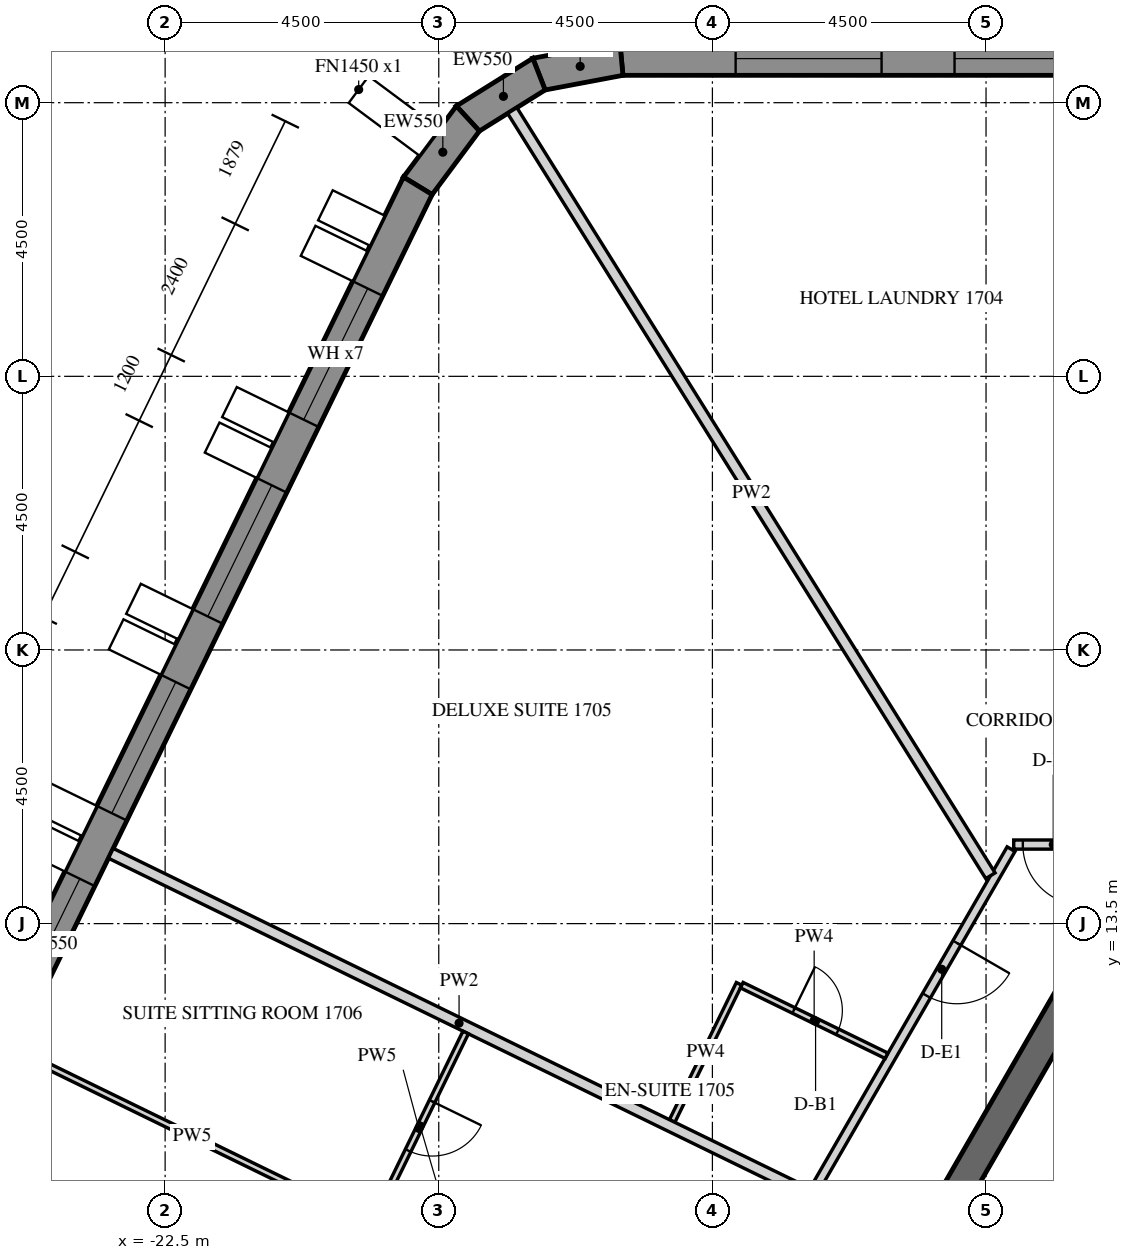
"""IFC4 building model, lengths in metres.
Left out: names, types, materials, properties, quantities, classifications, styles, units other than length and angle.
Written with IfcOpenShell. Run it as: python <this file> out.ifc"""

import sys

from ifc_helpers import new_model, si_unit, direction, frame, frame_2d, origin, place, context, subcontext, project, spatial, polyline, rectangle, outline, extrude, element, fill, save


model = new_model("IFC4")
c1 = context("Model", 3, precision=1e-05, world=origin(), true_north=direction((0.0, 1.0)))
c2 = subcontext(c1, "Body", "Model", "MODEL_VIEW")
j1 = project(units=[si_unit("LENGTHUNIT", "METRE"), si_unit("PLANEANGLEUNIT", "RADIAN")], contexts=[c1])
p1 = place(None, origin())
s1 = spatial("IfcSite", under=j1, at=p1, CompositionType="ELEMENT")
p2 = place(p1, origin())
s2 = spatial("IfcBuilding", under=s1, at=p2, CompositionType="ELEMENT")
p3 = place(p2, frame((0.0, 0.0, 215.1)))
s3 = spatial("IfcBuildingStorey", under=s2, at=p3, CompositionType="ELEMENT", Elevation=215.1)
p4 = place(p3, frame((12.761, 27.725, -0.15), z_axis=(0.0, 0.0, 1.0), x_axis=(-1.0, 0.0, 0.0)))
e1 = element("IfcWall", 1, at=p4, inside=s3, PredefinedType="SOLIDWALL", context=c2, shape_type="SweptSolid", body=[
    extrude(outline(polyline([(-0.022, -0.275), (27.783, -0.275), (27.732, 0.275), (0.022, 0.275), (-0.022, -0.275)])), origin(), (0.0, 0.0, 1.0), 3.9),
])
p5 = place(p4, frame((1.879, 0.0, 1.05)))
e2 = element("IfcOpeningElement", 2, at=p5, cuts=e1, PredefinedType="OPENING", context=c2, shape_type="SweptSolid", body=[
    extrude(rectangle(XDim=2.4, YDim=2.4, at=frame_2d((1.2, 1.2))), frame((0.0, 0.285, 0.0), z_axis=(0.0, -1.0, 0.0), x_axis=(1.0, 0.0, 0.0)), (0.0, 0.0, 1.0), 0.57),
])
p6 = place(p4, frame((5.479, 0.0, 1.05)))
e3 = element("IfcOpeningElement", 3, at=p6, cuts=e1, PredefinedType="OPENING", context=c2, shape_type="SweptSolid", body=[
    extrude(rectangle(XDim=2.4, YDim=2.4, at=frame_2d((1.2, 1.2))), frame((0.0, 0.285, 0.0), z_axis=(0.0, -1.0, 0.0), x_axis=(1.0, 0.0, 0.0)), (0.0, 0.0, 1.0), 0.57),
])
p7 = place(p4, frame((9.079, 0.0, 1.05)))
e4 = element("IfcOpeningElement", 4, at=p7, cuts=e1, PredefinedType="OPENING", context=c2, shape_type="SweptSolid", body=[
    extrude(rectangle(XDim=2.4, YDim=2.4, at=frame_2d((1.2, 1.2))), frame((0.0, 0.285, 0.0), z_axis=(0.0, -1.0, 0.0), x_axis=(1.0, 0.0, 0.0)), (0.0, 0.0, 1.0), 0.57),
])
p8 = place(p4, frame((12.679, 0.0, 1.05)))
e5 = element("IfcOpeningElement", 5, at=p8, cuts=e1, PredefinedType="OPENING", context=c2, shape_type="SweptSolid", body=[
    extrude(rectangle(XDim=2.4, YDim=2.4, at=frame_2d((1.2, 1.2))), frame((0.0, 0.285, 0.0), z_axis=(0.0, -1.0, 0.0), x_axis=(1.0, 0.0, 0.0)), (0.0, 0.0, 1.0), 0.57),
])
p9 = place(p4, frame((16.279, 0.0, 1.05)))
e6 = element("IfcOpeningElement", 6, at=p9, cuts=e1, PredefinedType="OPENING", context=c2, shape_type="SweptSolid", body=[
    extrude(rectangle(XDim=2.4, YDim=2.4, at=frame_2d((1.2, 1.2))), frame((0.0, 0.285, 0.0), z_axis=(0.0, -1.0, 0.0), x_axis=(1.0, 0.0, 0.0)), (0.0, 0.0, 1.0), 0.57),
])
p10 = place(p4, frame((19.879, 0.0, 1.05)))
e7 = element("IfcOpeningElement", 7, at=p10, cuts=e1, PredefinedType="OPENING", context=c2, shape_type="SweptSolid", body=[
    extrude(rectangle(XDim=2.4, YDim=2.4, at=frame_2d((1.2, 1.2))), frame((0.0, 0.285, 0.0), z_axis=(0.0, -1.0, 0.0), x_axis=(1.0, 0.0, 0.0)), (0.0, 0.0, 1.0), 0.57),
])
p11 = place(p4, frame((23.479, 0.0, 1.05)))
e8 = element("IfcOpeningElement", 8, at=p11, cuts=e1, PredefinedType="OPENING", context=c2, shape_type="SweptSolid", body=[
    extrude(rectangle(XDim=2.4, YDim=2.4, at=frame_2d((1.2, 1.2))), frame((0.0, 0.285, 0.0), z_axis=(0.0, -1.0, 0.0), x_axis=(1.0, 0.0, 0.0)), (0.0, 0.0, 1.0), 0.57),
])
p12 = place(p3, frame((-14.997, 27.725, -0.15), z_axis=(0.0, 0.0, 1.0), x_axis=(-0.982705443133, -0.185175624845, 0.0)))
e9 = element("IfcWall", 9, at=p12, inside=s3, PredefinedType="SOLIDWALL", context=c2, shape_type="SweptSolid", body=[
    extrude(outline(polyline([(-0.026, -0.275), (1.431, -0.275), (1.327, 0.275), (0.026, 0.275), (-0.026, -0.275)])), origin(), (0.0, 0.0, 1.0), 3.9),
])
p13 = place(p3, frame((-16.352, 27.47, -0.15), z_axis=(0.0, 0.0, 1.0), x_axis=(-0.848057977594, -0.5299034503, 0.0)))
e10 = element("IfcWall", 10, at=p13, inside=s3, PredefinedType="SOLIDWALL", context=c2, shape_type="SweptSolid", body=[
    extrude(outline(polyline([(-0.052, -0.275), (1.431, -0.275), (1.327, 0.275), (0.052, 0.275), (-0.052, -0.275)])), origin(), (0.0, 0.0, 1.0), 3.9),
])
p14 = place(p3, frame((-17.521, 26.739, -0.15), z_axis=(0.0, 0.0, 1.0), x_axis=(-0.597135295884, -0.802140535324, 0.0)))
e11 = element("IfcWall", 11, at=p14, inside=s3, PredefinedType="SOLIDWALL", context=c2, shape_type="SweptSolid", body=[
    extrude(outline(polyline([(-0.052, -0.275), (1.405, -0.275), (1.354, 0.275), (0.052, 0.275), (-0.052, -0.275)])), origin(), (0.0, 0.0, 1.0), 3.9),
])
p15 = place(p3, frame((-18.345, 25.633, -0.15), z_axis=(0.0, 0.0, 1.0), x_axis=(-0.43837181828, -0.898793718791, 0.0)))
e12 = element("IfcWall", 12, at=p15, inside=s3, PredefinedType="SOLIDWALL", context=c2, shape_type="SweptSolid", body=[
    extrude(outline(polyline([(-0.026, -0.275), (27.78, -0.275), (27.735, 0.275), (0.026, 0.275), (-0.026, -0.275)])), origin(), (0.0, 0.0, 1.0), 3.9),
])
p16 = place(p15, frame((1.879, 0.0, 1.05)))
e13 = element("IfcOpeningElement", 13, at=p16, cuts=e12, PredefinedType="OPENING", context=c2, shape_type="SweptSolid", body=[
    extrude(rectangle(XDim=2.4, YDim=2.4, at=frame_2d((1.2, 1.2))), frame((0.0, 0.285, 0.0), z_axis=(0.0, -1.0, 0.0), x_axis=(1.0, 0.0, 0.0)), (0.0, 0.0, 1.0), 0.57),
])
p17 = place(p15, frame((5.479, 0.0, 1.05)))
e14 = element("IfcOpeningElement", 14, at=p17, cuts=e12, PredefinedType="OPENING", context=c2, shape_type="SweptSolid", body=[
    extrude(rectangle(XDim=2.4, YDim=2.4, at=frame_2d((1.2, 1.2))), frame((0.0, 0.285, 0.0), z_axis=(0.0, -1.0, 0.0), x_axis=(1.0, 0.0, 0.0)), (0.0, 0.0, 1.0), 0.57),
])
p18 = place(p15, frame((9.079, 0.0, 1.05)))
e15 = element("IfcOpeningElement", 15, at=p18, cuts=e12, PredefinedType="OPENING", context=c2, shape_type="SweptSolid", body=[
    extrude(rectangle(XDim=2.4, YDim=2.4, at=frame_2d((1.2, 1.2))), frame((0.0, 0.285, 0.0), z_axis=(0.0, -1.0, 0.0), x_axis=(1.0, 0.0, 0.0)), (0.0, 0.0, 1.0), 0.57),
])
p19 = place(p15, frame((12.679, 0.0, 1.05)))
e16 = element("IfcOpeningElement", 16, at=p19, cuts=e12, PredefinedType="OPENING", context=c2, shape_type="SweptSolid", body=[
    extrude(rectangle(XDim=2.4, YDim=2.4, at=frame_2d((1.2, 1.2))), frame((0.0, 0.285, 0.0), z_axis=(0.0, -1.0, 0.0), x_axis=(1.0, 0.0, 0.0)), (0.0, 0.0, 1.0), 0.57),
])
p20 = place(p15, frame((16.279, 0.0, 1.05)))
e17 = element("IfcOpeningElement", 17, at=p20, cuts=e12, PredefinedType="OPENING", context=c2, shape_type="SweptSolid", body=[
    extrude(rectangle(XDim=2.4, YDim=2.4, at=frame_2d((1.2, 1.2))), frame((0.0, 0.285, 0.0), z_axis=(0.0, -1.0, 0.0), x_axis=(1.0, 0.0, 0.0)), (0.0, 0.0, 1.0), 0.57),
])
p21 = place(p15, frame((19.879, 0.0, 1.05)))
e18 = element("IfcOpeningElement", 18, at=p21, cuts=e12, PredefinedType="OPENING", context=c2, shape_type="SweptSolid", body=[
    extrude(rectangle(XDim=2.4, YDim=2.4, at=frame_2d((1.2, 1.2))), frame((0.0, 0.285, 0.0), z_axis=(0.0, -1.0, 0.0), x_axis=(1.0, 0.0, 0.0)), (0.0, 0.0, 1.0), 0.57),
])
p22 = place(p15, frame((23.479, 0.0, 1.05)))
e19 = element("IfcOpeningElement", 19, at=p22, cuts=e12, PredefinedType="OPENING", context=c2, shape_type="SweptSolid", body=[
    extrude(rectangle(XDim=2.4, YDim=2.4, at=frame_2d((1.2, 1.2))), frame((0.0, 0.285, 0.0), z_axis=(0.0, -1.0, 0.0), x_axis=(1.0, 0.0, 0.0)), (0.0, 0.0, 1.0), 0.57),
])
p23 = place(p3, frame((-7.361, 12.75, -0.15), z_axis=(0.0, 0.0, 1.0), x_axis=(-0.50000571537, -0.866022103989, 0.0)))
e20 = element("IfcWall", 20, at=p23, inside=s3, PredefinedType="SHEAR", context=c2, shape_type="SweptSolid", body=[
    extrude(outline(polyline([(-0.144, -0.25), (14.867, -0.25), (14.578, 0.25), (0.144, 0.25), (-0.144, -0.25)])), origin(), (0.0, 0.0, 1.0), 3.9),
])
p24 = place(p23, frame((6.49, 0.0, 0.15)))
e21 = element("IfcOpeningElement", 21, at=p24, cuts=e20, PredefinedType="OPENING", context=c2, shape_type="SweptSolid", body=[
    extrude(rectangle(XDim=1.8, YDim=2.4, at=frame_2d((0.9, 1.2))), frame((0.0, 0.26, 0.0), z_axis=(0.0, -1.0, 0.0), x_axis=(1.0, 0.0, 0.0)), (0.0, 0.0, 1.0), 0.52),
])
p25 = place(p3, frame((-5.673, 9.825, -0.15), z_axis=(0.0, 0.0, 1.0), x_axis=(-0.499995046907, -0.866028263435, 0.0)))
e22 = element("IfcWall", 22, at=p25, inside=s3, PredefinedType="SHEAR", context=c2, shape_type="SweptSolid", body=[
    extrude(outline(polyline([(-0.101, -0.175), (11.446, -0.175), (11.244, 0.175), (0.101, 0.175), (-0.101, -0.175)])), origin(), (0.0, 0.0, 1.0), 3.9),
])
p26 = place(p25, frame((4.801, 0.0, 0.15)))
e23 = element("IfcOpeningElement", 23, at=p26, cuts=e22, PredefinedType="OPENING", context=c2, shape_type="SweptSolid", body=[
    extrude(rectangle(XDim=1.8, YDim=2.4, at=frame_2d((0.9, 1.2))), frame((0.0, 0.185, 0.0), z_axis=(0.0, -1.0, 0.0), x_axis=(1.0, 0.0, 0.0)), (0.0, 0.0, 1.0), 0.37),
])
p27 = place(p3, frame((6.091, 14.8, 0.0), z_axis=(0.0, 0.0, 1.0), x_axis=(-1.0, 0.0, 0.0)))
e24 = element("IfcWall", 24, at=p27, inside=s3, PredefinedType="PARTITIONING", context=c2, shape_type="SweptSolid", body=[
    extrude(rectangle(XDim=14.636, YDim=0.15, at=frame_2d((7.318, 0.0))), origin(), (0.0, 0.0, 1.0), 2.988),
])
p28 = place(p27, frame((0.761, 0.0, 0.0)))
e25 = element("IfcOpeningElement", 25, at=p28, cuts=e24, PredefinedType="OPENING", context=c2, shape_type="SweptSolid", body=[
    extrude(rectangle(XDim=1.0, YDim=2.1, at=frame_2d((0.5, 1.05))), frame((0.0, 0.085, 0.0), z_axis=(0.0, -1.0, 0.0), x_axis=(1.0, 0.0, 0.0)), (0.0, 0.0, 1.0), 0.17),
])
p29 = place(p27, frame((6.709, 0.0, 0.0)))
e26 = element("IfcOpeningElement", 26, at=p29, cuts=e24, PredefinedType="OPENING", context=c2, shape_type="SweptSolid", body=[
    extrude(rectangle(XDim=1.0, YDim=2.1, at=frame_2d((0.5, 1.05))), frame((0.0, 0.085, 0.0), z_axis=(0.0, -1.0, 0.0), x_axis=(1.0, 0.0, 0.0)), (0.0, 0.0, 1.0), 0.17),
])
p30 = place(p27, frame((10.309, 0.0, 0.0)))
e27 = element("IfcOpeningElement", 27, at=p30, cuts=e24, PredefinedType="OPENING", context=c2, shape_type="SweptSolid", body=[
    extrude(rectangle(XDim=1.0, YDim=2.1, at=frame_2d((0.5, 1.05))), frame((0.0, 0.085, 0.0), z_axis=(0.0, -1.0, 0.0), x_axis=(1.0, 0.0, 0.0)), (0.0, 0.0, 1.0), 0.17),
])
p31 = place(p27, frame((13.486, 0.0, 0.0)))
e28 = element("IfcOpeningElement", 28, at=p31, cuts=e24, PredefinedType="OPENING", context=c2, shape_type="SweptSolid", body=[
    extrude(rectangle(XDim=1.0, YDim=2.1, at=frame_2d((0.5, 1.05))), frame((0.0, 0.085, 0.0), z_axis=(0.0, -1.0, 0.0), x_axis=(1.0, 0.0, 0.0)), (0.0, 0.0, 1.0), 0.17),
])
p32 = place(p3, frame((-8.588, 14.725, 0.0), z_axis=(0.0, 0.0, 1.0), x_axis=(-0.499999403554, -0.866025748143, 0.0)))
e29 = element("IfcWall", 29, at=p32, inside=s3, PredefinedType="PARTITIONING", context=c2, shape_type="SweptSolid", body=[
    extrude(rectangle(XDim=14.549, YDim=0.15, at=frame_2d((7.275, 0.0))), origin(), (0.0, 0.0, 1.0), 2.988),
])
p33 = place(p32, frame((1.781, 0.0, 0.0)))
e30 = element("IfcOpeningElement", 30, at=p33, cuts=e29, PredefinedType="OPENING", context=c2, shape_type="SweptSolid", body=[
    extrude(rectangle(XDim=1.0, YDim=2.1, at=frame_2d((0.5, 1.05))), frame((0.0, 0.085, 0.0), z_axis=(0.0, -1.0, 0.0), x_axis=(1.0, 0.0, 0.0)), (0.0, 0.0, 1.0), 0.17),
])
p34 = place(p32, frame((8.705, 0.0, 0.0)))
e31 = element("IfcOpeningElement", 31, at=p34, cuts=e29, PredefinedType="OPENING", context=c2, shape_type="SweptSolid", body=[
    extrude(rectangle(XDim=1.0, YDim=2.1, at=frame_2d((0.5, 1.05))), frame((0.0, 0.085, 0.0), z_axis=(0.0, -1.0, 0.0), x_axis=(1.0, 0.0, 0.0)), (0.0, 0.0, 1.0), 0.17),
])
p35 = place(p3, frame((-16.791, 26.871, 0.0), z_axis=(0.0, 0.0, 1.0), x_axis=(0.529927950822, -0.848042668111, 0.0)))
e32 = element("IfcWall", 32, at=p35, inside=s3, PredefinedType="PARTITIONING", context=c2, shape_type="SweptSolid", body=[
    extrude(rectangle(XDim=14.839, YDim=0.18, at=frame_2d((7.419, 0.0))), origin(), (0.0, 0.0, 1.0), 2.988),
])
p36 = place(p3, frame((-14.162, 10.254, 0.0), z_axis=(0.0, 0.0, 1.0), x_axis=(0.438398718232, 0.898780598284, 0.0)))
e33 = element("IfcWall", 33, at=p36, inside=s3, PredefinedType="PARTITIONING", context=c2, shape_type="SweptSolid", body=[
    extrude(rectangle(XDim=2.51, YDim=0.1, at=frame_2d((1.255, 0.0))), origin(), (0.0, 0.0, 1.0), 2.988),
])
p37 = place(p3, frame((-13.017, 12.488, 0.0), z_axis=(0.0, 0.0, 1.0), x_axis=(0.89882691906, -0.438303741226, 0.0)))
e34 = element("IfcWall", 34, at=p37, inside=s3, PredefinedType="PARTITIONING", context=c2, shape_type="SweptSolid", body=[
    extrude(rectangle(XDim=2.648, YDim=0.1, at=frame_2d((1.324, 0.0))), origin(), (0.0, 0.0, 1.0), 2.988),
])
p38 = place(p37, frame((0.95, 0.0, 0.0)))
e35 = element("IfcOpeningElement", 35, at=p38, cuts=e34, PredefinedType="OPENING", context=c2, shape_type="SweptSolid", body=[
    extrude(rectangle(XDim=0.8, YDim=2.1, at=frame_2d((0.4, 1.05))), frame((0.0, 0.06, 0.0), z_axis=(0.0, -1.0, 0.0), x_axis=(1.0, 0.0, 0.0)), (0.0, 0.0, 1.0), 0.12),
])
p39 = place(p3, frame((-23.393, 14.656, 0.0), z_axis=(0.0, 0.0, 1.0), x_axis=(0.898790356386, -0.438378712152, 0.0)))
e36 = element("IfcWall", 36, at=p39, inside=s3, PredefinedType="PARTITIONING", context=c2, shape_type="SweptSolid", body=[
    extrude(rectangle(XDim=12.743, YDim=0.18, at=frame_2d((6.372, 0.0))), origin(), (0.0, 0.0, 1.0), 2.988),
])
p40 = place(p3, frame((-17.557, 11.71, 0.0), z_axis=(0.0, 0.0, 1.0), x_axis=(-0.438400335718, -0.898779809321, 0.0)))
e37 = element("IfcWall", 37, at=p40, inside=s3, PredefinedType="PARTITIONING", context=c2, shape_type="SweptSolid", body=[
    extrude(rectangle(XDim=3.51, YDim=0.1, at=frame_2d((1.755, 0.0))), origin(), (0.0, 0.0, 1.0), 2.988),
])
p41 = place(p40, frame((1.26, 0.0, 0.0)))
e38 = element("IfcOpeningElement", 38, at=p41, cuts=e37, PredefinedType="OPENING", context=c2, shape_type="SweptSolid", body=[
    extrude(rectangle(XDim=0.9, YDim=2.1, at=frame_2d((0.45, 1.05))), frame((0.0, 0.06, 0.0), z_axis=(0.0, -1.0, 0.0), x_axis=(1.0, 0.0, 0.0)), (0.0, 0.0, 1.0), 0.12),
])
p42 = place(p3, frame((-19.141, 8.577, 0.0), z_axis=(0.0, 0.0, 1.0), x_axis=(-0.898794850282, 0.438369498377, 0.0)))
e39 = element("IfcWall", 39, at=p42, inside=s3, PredefinedType="PARTITIONING", context=c2, shape_type="SweptSolid", body=[
    extrude(rectangle(XDim=6.487, YDim=0.1, at=frame_2d((3.243, 0.0))), origin(), (0.0, 0.0, 1.0), 2.988),
])
p43 = place(p10, frame((0.0, 0.205, 0.0)))
e40 = element("IfcWindow", 40, at=p43, inside=s3, PartitioningType="DOUBLE_PANEL_VERTICAL", PredefinedType="WINDOW", context=c2, shape_type="SweptSolid", body=[
    extrude(rectangle(XDim=2.4, YDim=2.4, at=frame_2d((1.2, 1.2))), frame((0.0, 0.03, 0.0), z_axis=(0.0, -1.0, 0.0), x_axis=(1.0, 0.0, 0.0)), (0.0, 0.0, 1.0), 0.06),
])
fill(e7, e40)
p44 = place(p11, frame((0.0, 0.205, 0.0)))
e41 = element("IfcWindow", 41, at=p44, inside=s3, PartitioningType="DOUBLE_PANEL_VERTICAL", PredefinedType="WINDOW", context=c2, shape_type="SweptSolid", body=[
    extrude(rectangle(XDim=2.4, YDim=2.4, at=frame_2d((1.2, 1.2))), frame((0.0, 0.03, 0.0), z_axis=(0.0, -1.0, 0.0), x_axis=(1.0, 0.0, 0.0)), (0.0, 0.0, 1.0), 0.06),
])
fill(e8, e41)
p45 = place(p16, frame((0.0, 0.205, 0.0)))
e42 = element("IfcWindow", 42, at=p45, inside=s3, PartitioningType="DOUBLE_PANEL_VERTICAL", PredefinedType="WINDOW", context=c2, shape_type="SweptSolid", body=[
    extrude(rectangle(XDim=2.4, YDim=2.4, at=frame_2d((1.2, 1.2))), frame((0.0, 0.03, 0.0), z_axis=(0.0, -1.0, 0.0), x_axis=(1.0, 0.0, 0.0)), (0.0, 0.0, 1.0), 0.06),
])
fill(e13, e42)
p46 = place(p17, frame((0.0, 0.205, 0.0)))
e43 = element("IfcWindow", 43, at=p46, inside=s3, PartitioningType="DOUBLE_PANEL_VERTICAL", PredefinedType="WINDOW", context=c2, shape_type="SweptSolid", body=[
    extrude(rectangle(XDim=2.4, YDim=2.4, at=frame_2d((1.2, 1.2))), frame((0.0, 0.03, 0.0), z_axis=(0.0, -1.0, 0.0), x_axis=(1.0, 0.0, 0.0)), (0.0, 0.0, 1.0), 0.06),
])
fill(e14, e43)
p47 = place(p18, frame((0.0, 0.205, 0.0)))
e44 = element("IfcWindow", 44, at=p47, inside=s3, PartitioningType="DOUBLE_PANEL_VERTICAL", PredefinedType="WINDOW", context=c2, shape_type="SweptSolid", body=[
    extrude(rectangle(XDim=2.4, YDim=2.4, at=frame_2d((1.2, 1.2))), frame((0.0, 0.03, 0.0), z_axis=(0.0, -1.0, 0.0), x_axis=(1.0, 0.0, 0.0)), (0.0, 0.0, 1.0), 0.06),
])
fill(e15, e44)
p48 = place(p19, frame((0.0, 0.205, 0.0)))
e45 = element("IfcWindow", 45, at=p48, inside=s3, PartitioningType="DOUBLE_PANEL_VERTICAL", PredefinedType="WINDOW", context=c2, shape_type="SweptSolid", body=[
    extrude(rectangle(XDim=2.4, YDim=2.4, at=frame_2d((1.2, 1.2))), frame((0.0, 0.03, 0.0), z_axis=(0.0, -1.0, 0.0), x_axis=(1.0, 0.0, 0.0)), (0.0, 0.0, 1.0), 0.06),
])
fill(e16, e45)
p49 = place(p31, origin())
e46 = element("IfcDoor", 46, at=p49, inside=s3, OperationType="SINGLE_SWING_LEFT", PredefinedType="DOOR", context=c2, shape_type="SweptSolid", body=[
    extrude(rectangle(XDim=1.0, YDim=2.1, at=frame_2d((0.5, 1.05))), frame((0.0, 0.025, 0.0), z_axis=(0.0, -1.0, 0.0), x_axis=(1.0, 0.0, 0.0)), (0.0, 0.0, 1.0), 0.05),
])
fill(e28, e46)
p50 = place(p33, origin())
e47 = element("IfcDoor", 47, at=p50, inside=s3, OperationType="SINGLE_SWING_LEFT", PredefinedType="DOOR", context=c2, shape_type="SweptSolid", body=[
    extrude(rectangle(XDim=1.0, YDim=2.1, at=frame_2d((0.5, 1.05))), frame((0.0, 0.025, 0.0), z_axis=(0.0, -1.0, 0.0), x_axis=(1.0, 0.0, 0.0)), (0.0, 0.0, 1.0), 0.05),
])
fill(e30, e47)
p51 = place(p38, origin())
e48 = element("IfcDoor", 48, at=p51, inside=s3, OperationType="SINGLE_SWING_LEFT", PredefinedType="DOOR", context=c2, shape_type="SweptSolid", body=[
    extrude(rectangle(XDim=0.8, YDim=2.1, at=frame_2d((0.4, 1.05))), frame((0.0, 0.025, 0.0), z_axis=(0.0, -1.0, 0.0), x_axis=(1.0, 0.0, 0.0)), (0.0, 0.0, 1.0), 0.05),
])
fill(e35, e48)
p52 = place(p41, origin())
e49 = element("IfcDoor", 49, at=p52, inside=s3, OperationType="SINGLE_SWING_RIGHT", PredefinedType="DOOR", context=c2, shape_type="SweptSolid", body=[
    extrude(rectangle(XDim=0.9, YDim=2.1, at=frame_2d((0.45, 1.05))), frame((0.0, 0.025, 0.0), z_axis=(0.0, -1.0, 0.0), x_axis=(1.0, 0.0, 0.0)), (0.0, 0.0, 1.0), 0.05),
])
fill(e38, e49)
save(model, sys.argv[1])
